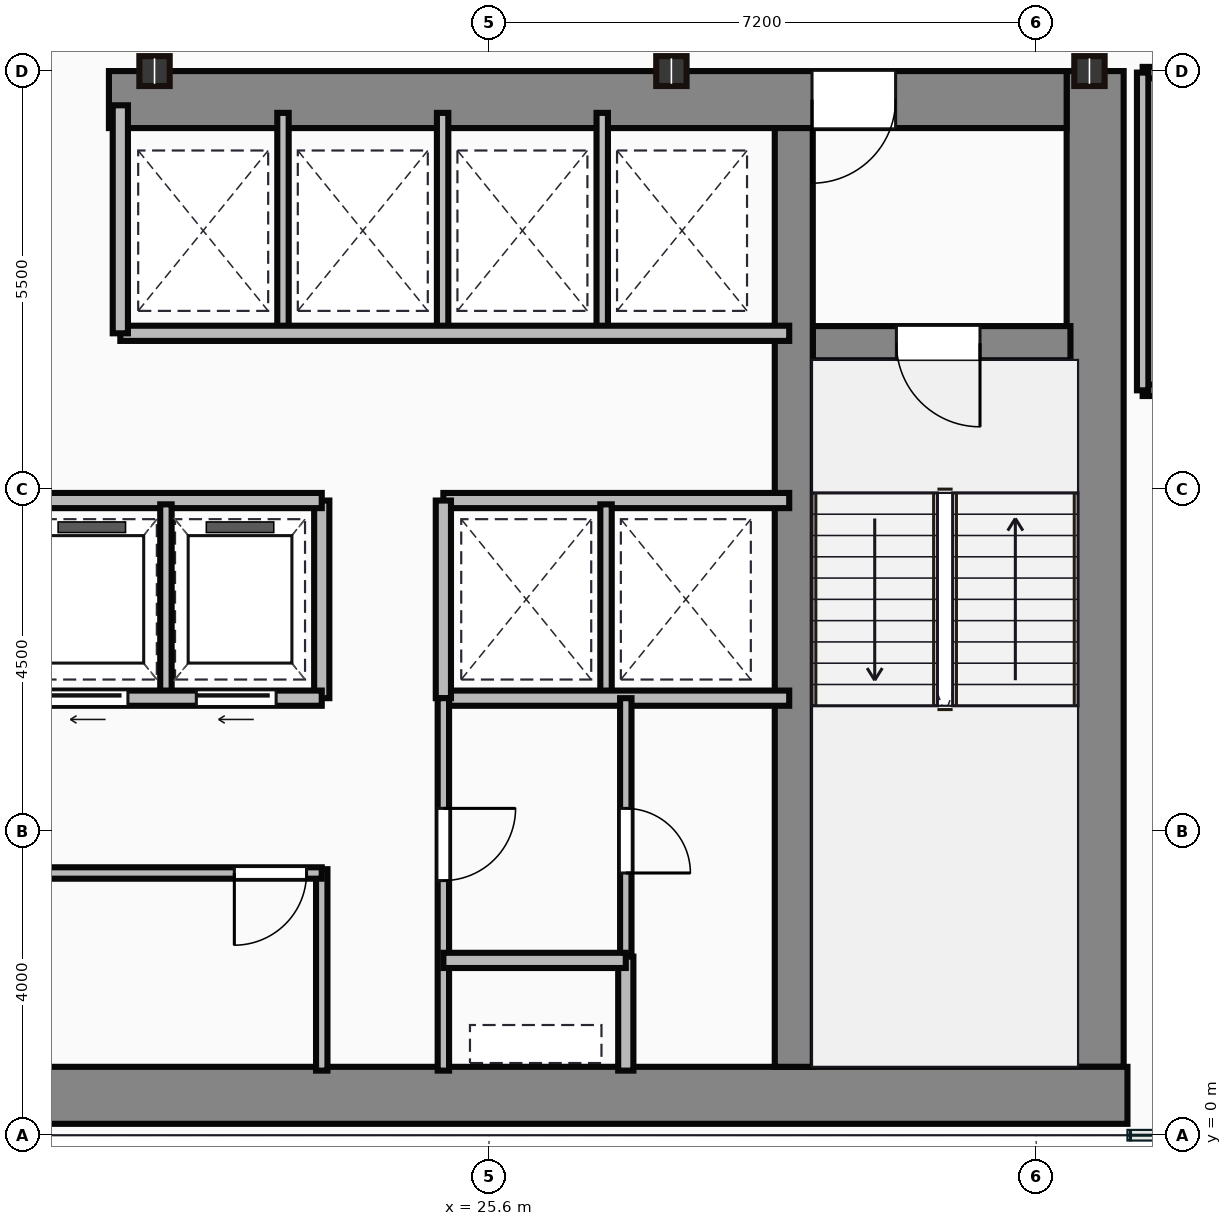
"""IFC4 building model, lengths in metres.
Left out: names, types, materials, properties, quantities, classifications, styles, units other than length and angle.
Written with IfcOpenShell. Run it as: python <this file> out.ifc"""

import sys

from ifc_helpers import new_model, si_unit, direction, frame, frame_2d, origin, origin_2d, place, context, subcontext, project, spatial, rectangle, i_section, extrude, source, transform, mapped, element, fill, save


model = new_model("IFC4")
c1 = context("Model", 3, precision=1e-05, world=origin(), true_north=direction((0.0, 1.0)))
c2 = subcontext(c1, "Body", "Model", "MODEL_VIEW")
j1 = project(units=[si_unit("LENGTHUNIT", "METRE"), si_unit("PLANEANGLEUNIT", "RADIAN")], contexts=[c1])
p1 = place(None, origin())
s1 = spatial("IfcSite", under=j1, at=p1, CompositionType="ELEMENT")
p2 = place(p1, origin())
s2 = spatial("IfcBuilding", under=s1, at=p2, CompositionType="ELEMENT")
p3 = place(p2, frame((0.0, 0.0, 114.2)))
s3 = spatial("IfcBuildingStorey", under=s2, at=p3, CompositionType="ELEMENT", Elevation=114.2)
m1 = source(origin(), c2, "Body", "SweptSolid", [
    extrude(rectangle(XDim=29.5, YDim=0.75, at=frame_2d((14.75, 0.0))), origin(), (0.0, 0.0, 1.0), 3.65),
])
p4 = place(p3, frame((4.5, 0.525, 0.0), z_axis=(0.0, 0.0, 1.0), x_axis=(1.0, 0.0, 0.0)))
e1 = element("IfcWall", 1, at=p4, inside=s3, PredefinedType="SHEAR", context=c2, shape_type="MappedRepresentation", body=[
    mapped(m1, transform((0.0, 0.0, 0.0))),
])
m2 = source(origin(), c2, "Body", "SweptSolid", [
    extrude(rectangle(XDim=13.1, YDim=0.75, at=frame_2d((6.55, 0.0))), origin(), (0.0, 0.0, 1.0), 3.65),
])
p5 = place(p3, frame((33.575, 0.9, 0.0), z_axis=(0.0, 0.0, 1.0), x_axis=(0.0, 1.0, 0.0)))
e2 = element("IfcWall", 2, at=p5, inside=s3, PredefinedType="SHEAR", context=c2, shape_type="MappedRepresentation", body=[
    mapped(m2, transform((0.0, 0.0, 0.0))),
])
m3 = source(origin(), c2, "Body", "SweptSolid", [
    extrude(rectangle(XDim=12.6, YDim=0.75, at=frame_2d((6.3, 0.0))), origin(), (0.0, 0.0, 1.0), 3.65),
])
p6 = place(p3, frame((20.6, 13.625, 0.0), z_axis=(0.0, 0.0, 1.0), x_axis=(1.0, 0.0, 0.0)))
e3 = element("IfcWall", 3, at=p6, inside=s3, PredefinedType="SHEAR", context=c2, shape_type="MappedRepresentation", body=[
    mapped(m3, transform((0.0, 0.0, 0.0))),
])
p7 = place(p6, frame((9.25, 0.0, 0.0)))
e4 = element("IfcOpeningElement", 4, at=p7, cuts=e3, PredefinedType="OPENING", context=c2, shape_type="SweptSolid", body=[
    extrude(rectangle(XDim=1.1, YDim=2.15, at=frame_2d((0.55, 1.075))), frame((0.0, 0.385, 0.0), z_axis=(0.0, -1.0, 0.0), x_axis=(1.0, 0.0, 0.0)), (0.0, 0.0, 1.0), 0.77),
])
m4 = source(origin(), c2, "Body", "SweptSolid", [
    extrude(rectangle(XDim=12.35, YDim=0.5, at=frame_2d((6.175, 0.0))), origin(), (0.0, 0.0, 1.0), 3.65),
])
p8 = place(p3, frame((29.61, 0.9, 0.0), z_axis=(0.0, 0.0, 1.0), x_axis=(0.0, 1.0, 0.0)))
e5 = element("IfcWall", 5, at=p8, inside=s3, PredefinedType="SHEAR", context=c2, shape_type="MappedRepresentation", body=[
    mapped(m4, transform((0.0, 0.0, 0.0))),
])
m5 = source(origin(), c2, "Body", "SweptSolid", [
    extrude(rectangle(XDim=3.39, YDim=0.45, at=frame_2d((1.695, 0.0))), origin(), (0.0, 0.0, 1.0), 3.65),
])
p9 = place(p3, frame((29.86, 10.42, 0.0), z_axis=(0.0, 0.0, 1.0), x_axis=(1.0, 0.0, 0.0)))
e6 = element("IfcWall", 6, at=p9, inside=s3, PredefinedType="SHEAR", context=c2, shape_type="MappedRepresentation", body=[
    mapped(m5, transform((0.0, 0.0, 0.0))),
])
p10 = place(p9, frame((1.1, 0.0, 0.0)))
e7 = element("IfcOpeningElement", 7, at=p10, cuts=e6, PredefinedType="OPENING", context=c2, shape_type="SweptSolid", body=[
    extrude(rectangle(XDim=1.1, YDim=2.15, at=frame_2d((0.55, 1.075))), frame((0.0, 0.235, 0.0), z_axis=(0.0, -1.0, 0.0), x_axis=(1.0, 0.0, 0.0)), (0.0, 0.0, 1.0), 0.47),
])
m6 = source(origin(), c2, "Body", "SweptSolid", [
    extrude(i_section(OverallWidth=0.399, OverallDepth=0.393, WebThickness=0.023, FlangeThickness=0.037, at=origin_2d()), origin(), (0.0, 0.0, 1.0), 3.65),
])
for number, where, z_axis, x_axis in (
    (8, (21.2, 14.0, 0.0), (0.0, 0.0, 1.0), (1.0, 0.0, 0.0)),
    (9, (28.0, 14.0, 0.0), (0.0, 0.0, 1.0), (1.0, 0.0, 0.0)),
    (10, (33.5, 14.0, 0.0), (0.0, 0.0, 1.0), (1.0, 0.0, 0.0)),
):
    element("IfcColumn", number, at=place(p3, frame(where, z_axis=z_axis, x_axis=x_axis)), inside=s3, PredefinedType="COLUMN", context=c2, shape_type="MappedRepresentation", body=[
        mapped(m6, transform((0.0, 0.0, 0.0))),
    ])
m7 = source(origin(), c2, "Body", "SweptSolid", [
    extrude(rectangle(XDim=10.35, YDim=0.15, at=frame_2d((5.175, 0.0))), origin(), (0.0, 0.0, 1.0), 3.4),
])
p11 = place(p3, frame((13.05, 3.45, 0.0), z_axis=(0.0, 0.0, 1.0), x_axis=(1.0, 0.0, 0.0)))
e11 = element("IfcWall", 11, at=p11, inside=s3, PredefinedType="PARTITIONING", context=c2, shape_type="MappedRepresentation", body=[
    mapped(m7, transform((0.0, 0.0, 0.0))),
])
p12 = place(p11, frame((1.1, 0.0, 0.0)))
e12 = element("IfcOpeningElement", 12, at=p12, cuts=e11, PredefinedType="OPENING", context=c2, shape_type="SweptSolid", body=[
    extrude(rectangle(XDim=0.95, YDim=2.15, at=frame_2d((0.475, 1.075))), frame((0.0, 0.085, 0.0), z_axis=(0.0, -1.0, 0.0), x_axis=(1.0, 0.0, 0.0)), (0.0, 0.0, 1.0), 0.17),
])
p13 = place(p11, frame((5.1, 0.0, 0.0)))
e13 = element("IfcOpeningElement", 13, at=p13, cuts=e11, PredefinedType="OPENING", context=c2, shape_type="SweptSolid", body=[
    extrude(rectangle(XDim=0.95, YDim=2.15, at=frame_2d((0.475, 1.075))), frame((0.0, 0.085, 0.0), z_axis=(0.0, -1.0, 0.0), x_axis=(1.0, 0.0, 0.0)), (0.0, 0.0, 1.0), 0.17),
])
p14 = place(p11, frame((9.2, 0.0, 0.0)))
e14 = element("IfcOpeningElement", 14, at=p14, cuts=e11, PredefinedType="OPENING", context=c2, shape_type="SweptSolid", body=[
    extrude(rectangle(XDim=0.95, YDim=2.15, at=frame_2d((0.475, 1.075))), frame((0.0, 0.085, 0.0), z_axis=(0.0, -1.0, 0.0), x_axis=(1.0, 0.0, 0.0)), (0.0, 0.0, 1.0), 0.17),
])
m8 = source(origin(), c2, "Body", "SweptSolid", [
    extrude(rectangle(XDim=2.65, YDim=0.15, at=frame_2d((1.325, 0.0))), origin(), (0.0, 0.0, 1.0), 3.4),
])
p15 = place(p3, frame((23.4, 0.85, 0.0), z_axis=(0.0, 0.0, 1.0), x_axis=(0.0, 1.0, 0.0)))
e15 = element("IfcWall", 15, at=p15, inside=s3, PredefinedType="PARTITIONING", context=c2, shape_type="MappedRepresentation", body=[
    mapped(m8, transform((0.0, 0.0, 0.0))),
])
m9 = source(origin(), c2, "Body", "SweptSolid", [
    extrude(rectangle(XDim=11.85, YDim=0.2, at=frame_2d((5.925, 0.0))), origin(), (0.0, 0.0, 1.0), 3.4),
])
p16 = place(p3, frame((11.55, 5.75, 0.0), z_axis=(0.0, 0.0, 1.0), x_axis=(1.0, 0.0, 0.0)))
e16 = element("IfcWall", 16, at=p16, inside=s3, PredefinedType="PARTITIONING", context=c2, shape_type="MappedRepresentation", body=[
    mapped(m9, transform((0.0, 0.0, 0.0))),
])
p17 = place(p16, frame((0.45, 0.0, 0.0)))
e17 = element("IfcOpeningElement", 17, at=p17, cuts=e16, PredefinedType="OPENING", context=c2, shape_type="SweptSolid", body=[
    extrude(rectangle(XDim=1.05, YDim=2.15, at=frame_2d((0.525, 1.075))), frame((0.0, 0.11, 0.0), z_axis=(0.0, -1.0, 0.0), x_axis=(1.0, 0.0, 0.0)), (0.0, 0.0, 1.0), 0.22),
])
p18 = place(p16, frame((2.4, 0.0, 0.0)))
e18 = element("IfcOpeningElement", 18, at=p18, cuts=e16, PredefinedType="OPENING", context=c2, shape_type="SweptSolid", body=[
    extrude(rectangle(XDim=1.05, YDim=2.15, at=frame_2d((0.525, 1.075))), frame((0.0, 0.11, 0.0), z_axis=(0.0, -1.0, 0.0), x_axis=(1.0, 0.0, 0.0)), (0.0, 0.0, 1.0), 0.22),
])
p19 = place(p16, frame((4.35, 0.0, 0.0)))
e19 = element("IfcOpeningElement", 19, at=p19, cuts=e16, PredefinedType="OPENING", context=c2, shape_type="SweptSolid", body=[
    extrude(rectangle(XDim=1.05, YDim=2.15, at=frame_2d((0.525, 1.075))), frame((0.0, 0.11, 0.0), z_axis=(0.0, -1.0, 0.0), x_axis=(1.0, 0.0, 0.0)), (0.0, 0.0, 1.0), 0.22),
])
p20 = place(p16, frame((6.3, 0.0, 0.0)))
e20 = element("IfcOpeningElement", 20, at=p20, cuts=e16, PredefinedType="OPENING", context=c2, shape_type="SweptSolid", body=[
    extrude(rectangle(XDim=1.05, YDim=2.15, at=frame_2d((0.525, 1.075))), frame((0.0, 0.11, 0.0), z_axis=(0.0, -1.0, 0.0), x_axis=(1.0, 0.0, 0.0)), (0.0, 0.0, 1.0), 0.22),
])
p21 = place(p16, frame((8.25, 0.0, 0.0)))
e21 = element("IfcOpeningElement", 21, at=p21, cuts=e16, PredefinedType="OPENING", context=c2, shape_type="SweptSolid", body=[
    extrude(rectangle(XDim=1.05, YDim=2.15, at=frame_2d((0.525, 1.075))), frame((0.0, 0.11, 0.0), z_axis=(0.0, -1.0, 0.0), x_axis=(1.0, 0.0, 0.0)), (0.0, 0.0, 1.0), 0.22),
])
p22 = place(p16, frame((10.2, 0.0, 0.0)))
e22 = element("IfcOpeningElement", 22, at=p22, cuts=e16, PredefinedType="OPENING", context=c2, shape_type="SweptSolid", body=[
    extrude(rectangle(XDim=1.05, YDim=2.15, at=frame_2d((0.525, 1.075))), frame((0.0, 0.11, 0.0), z_axis=(0.0, -1.0, 0.0), x_axis=(1.0, 0.0, 0.0)), (0.0, 0.0, 1.0), 0.22),
])
p23 = place(p3, frame((11.55, 8.35, 0.0), z_axis=(0.0, 0.0, 1.0), x_axis=(1.0, 0.0, 0.0)))
e23 = element("IfcWall", 23, at=p23, inside=s3, PredefinedType="PARTITIONING", context=c2, shape_type="MappedRepresentation", body=[
    mapped(m9, transform((0.0, 0.0, 0.0))),
])
m10 = source(origin(), c2, "Body", "SweptSolid", [
    extrude(rectangle(XDim=2.6, YDim=0.2, at=frame_2d((1.3, 0.0))), origin(), (0.0, 0.0, 1.0), 3.4),
])
p24 = place(p3, frame((23.4, 5.75, 0.0), z_axis=(0.0, 0.0, 1.0), x_axis=(0.0, 1.0, 0.0)))
e24 = element("IfcWall", 24, at=p24, inside=s3, PredefinedType="PARTITIONING", context=c2, shape_type="MappedRepresentation", body=[
    mapped(m10, transform((0.0, 0.0, 0.0))),
])
m11 = source(origin(), c2, "Body", "SweptSolid", [
    extrude(rectangle(XDim=2.5, YDim=0.15, at=frame_2d((1.25, 0.0))), origin(), (0.0, 0.0, 1.0), 3.4),
])
p25 = place(p3, frame((21.35, 5.8, 0.0), z_axis=(0.0, 0.0, 1.0), x_axis=(0.0, 1.0, 0.0)))
e25 = element("IfcWall", 25, at=p25, inside=s3, PredefinedType="PARTITIONING", context=c2, shape_type="MappedRepresentation", body=[
    mapped(m11, transform((0.0, 0.0, 0.0))),
])
m12 = source(origin(), c2, "Body", "SweptSolid", [
    extrude(rectangle(XDim=8.8, YDim=0.2, at=frame_2d((4.4, 0.0))), origin(), (0.0, 0.0, 1.0), 3.4),
])
p26 = place(p3, frame((20.75, 10.55, 0.0), z_axis=(0.0, 0.0, 1.0), x_axis=(1.0, 0.0, 0.0)))
e26 = element("IfcWall", 26, at=p26, inside=s3, PredefinedType="PARTITIONING", context=c2, shape_type="MappedRepresentation", body=[
    mapped(m12, transform((0.0, 0.0, 0.0))),
])
m13 = source(origin(), c2, "Body", "SweptSolid", [
    extrude(rectangle(XDim=3.0, YDim=0.2, at=frame_2d((1.5, 0.0))), origin(), (0.0, 0.0, 1.0), 3.4),
])
p27 = place(p3, frame((20.75, 10.55, 0.0), z_axis=(0.0, 0.0, 1.0), x_axis=(0.0, 1.0, 0.0)))
e27 = element("IfcWall", 27, at=p27, inside=s3, PredefinedType="PARTITIONING", context=c2, shape_type="MappedRepresentation", body=[
    mapped(m13, transform((0.0, 0.0, 0.0))),
])
m14 = source(origin(), c2, "Body", "SweptSolid", [
    extrude(rectangle(XDim=2.85, YDim=0.15, at=frame_2d((1.425, 0.0))), origin(), (0.0, 0.0, 1.0), 3.4),
])
for number, where, z_axis, x_axis in (
    (28, (22.89, 10.6, 0.0), (0.0, 0.0, 1.0), (0.0, 1.0, 0.0)),
    (29, (24.99, 10.6, 0.0), (0.0, 0.0, 1.0), (0.0, 1.0, 0.0)),
    (30, (27.09, 10.6, 0.0), (0.0, 0.0, 1.0), (0.0, 1.0, 0.0)),
):
    element("IfcWall", number, at=place(p3, frame(where, z_axis=z_axis, x_axis=x_axis)), inside=s3, PredefinedType="PARTITIONING", context=c2, shape_type="MappedRepresentation", body=[
        mapped(m14, transform((0.0, 0.0, 0.0))),
    ])
m15 = source(origin(), c2, "Body", "SweptSolid", [
    extrude(rectangle(XDim=4.55, YDim=0.2, at=frame_2d((2.275, 0.0))), origin(), (0.0, 0.0, 1.0), 3.4),
])
for number, where, z_axis, x_axis in (
    (31, (25.0, 8.35, 0.0), (0.0, 0.0, 1.0), (1.0, 0.0, 0.0)),
    (32, (25.0, 5.75, 0.0), (0.0, 0.0, 1.0), (1.0, 0.0, 0.0)),
):
    element("IfcWall", number, at=place(p3, frame(where, z_axis=z_axis, x_axis=x_axis)), inside=s3, PredefinedType="PARTITIONING", context=c2, shape_type="MappedRepresentation", body=[
        mapped(m15, transform((0.0, 0.0, 0.0))),
    ])
p28 = place(p3, frame((25.0, 5.75, 0.0), z_axis=(0.0, 0.0, 1.0), x_axis=(0.0, 1.0, 0.0)))
e33 = element("IfcWall", 33, at=p28, inside=s3, PredefinedType="PARTITIONING", context=c2, shape_type="MappedRepresentation", body=[
    mapped(m10, transform((0.0, 0.0, 0.0))),
])
p29 = place(p3, frame((27.14, 5.8, 0.0), z_axis=(0.0, 0.0, 1.0), x_axis=(0.0, 1.0, 0.0)))
e34 = element("IfcWall", 34, at=p29, inside=s3, PredefinedType="PARTITIONING", context=c2, shape_type="MappedRepresentation", body=[
    mapped(m11, transform((0.0, 0.0, 0.0))),
])
m16 = source(origin(), c2, "Body", "SweptSolid", [
    extrude(rectangle(XDim=4.9, YDim=0.15, at=frame_2d((2.45, 0.0))), origin(), (0.0, 0.0, 1.0), 3.4),
])
p30 = place(p3, frame((25.0, 0.85, 0.0), z_axis=(0.0, 0.0, 1.0), x_axis=(0.0, 1.0, 0.0)))
e35 = element("IfcWall", 35, at=p30, inside=s3, PredefinedType="PARTITIONING", context=c2, shape_type="MappedRepresentation", body=[
    mapped(m16, transform((0.0, 0.0, 0.0))),
])
p31 = place(p30, frame((2.5, 0.0, 0.0)))
e36 = element("IfcOpeningElement", 36, at=p31, cuts=e35, PredefinedType="OPENING", context=c2, shape_type="SweptSolid", body=[
    extrude(rectangle(XDim=0.95, YDim=2.15, at=frame_2d((0.475, 1.075))), frame((0.0, 0.085, 0.0), z_axis=(0.0, -1.0, 0.0), x_axis=(1.0, 0.0, 0.0)), (0.0, 0.0, 1.0), 0.17),
])
m17 = source(origin(), c2, "Body", "SweptSolid", [
    extrude(rectangle(XDim=2.4, YDim=0.2, at=frame_2d((1.2, 0.0))), origin(), (0.0, 0.0, 1.0), 3.4),
])
p32 = place(p3, frame((25.0, 2.3, 0.0), z_axis=(0.0, 0.0, 1.0), x_axis=(1.0, 0.0, 0.0)))
e37 = element("IfcWall", 37, at=p32, inside=s3, PredefinedType="PARTITIONING", context=c2, shape_type="MappedRepresentation", body=[
    mapped(m17, transform((0.0, 0.0, 0.0))),
])
m18 = source(origin(), c2, "Body", "SweptSolid", [
    extrude(rectangle(XDim=1.5, YDim=0.2, at=frame_2d((0.75, 0.0))), origin(), (0.0, 0.0, 1.0), 3.4),
])
p33 = place(p3, frame((27.4, 0.85, 0.0), z_axis=(0.0, 0.0, 1.0), x_axis=(0.0, 1.0, 0.0)))
e38 = element("IfcWall", 38, at=p33, inside=s3, PredefinedType="PARTITIONING", context=c2, shape_type="MappedRepresentation", body=[
    mapped(m18, transform((0.0, 0.0, 0.0))),
])
m19 = source(origin(), c2, "Body", "SweptSolid", [
    extrude(rectangle(XDim=3.4, YDim=0.15, at=frame_2d((1.7, 0.0))), origin(), (0.0, 0.0, 1.0), 3.4),
])
p34 = place(p3, frame((27.4, 2.35, 0.0), z_axis=(0.0, 0.0, 1.0), x_axis=(0.0, 1.0, 0.0)))
e39 = element("IfcWall", 39, at=p34, inside=s3, PredefinedType="PARTITIONING", context=c2, shape_type="MappedRepresentation", body=[
    mapped(m19, transform((0.0, 0.0, 0.0))),
])
p35 = place(p34, frame((1.1, 0.0, 0.0)))
e40 = element("IfcOpeningElement", 40, at=p35, cuts=e39, PredefinedType="OPENING", context=c2, shape_type="SweptSolid", body=[
    extrude(rectangle(XDim=0.85, YDim=2.1, at=frame_2d((0.425, 1.05))), frame((0.0, 0.085, 0.0), z_axis=(0.0, -1.0, 0.0), x_axis=(1.0, 0.0, 0.0)), (0.0, 0.0, 1.0), 0.17),
])
m20 = source(origin(), c2, "Body", "SweptSolid", [
    extrude(rectangle(XDim=4.8, YDim=0.15, at=frame_2d((2.4, 0.0))), origin(), (0.0, 0.0, 1.0), 2.702),
])
p36 = place(p3, frame((34.2, 13.98, 0.0), z_axis=(0.0, 0.0, 1.0), x_axis=(1.0, 0.0, 0.0)))
e41 = element("IfcWall", 41, at=p36, inside=s3, PredefinedType="PARTITIONING", context=c2, shape_type="MappedRepresentation", body=[
    mapped(m20, transform((0.0, 0.0, 0.0))),
])
p37 = place(p36, frame((0.35, 0.0, 0.0)))
e42 = element("IfcOpeningElement", 42, at=p37, cuts=e41, PredefinedType="OPENING", context=c2, shape_type="SweptSolid", body=[
    extrude(rectangle(XDim=0.85, YDim=2.1, at=frame_2d((0.425, 1.05))), frame((0.0, 0.085, 0.0), z_axis=(0.0, -1.0, 0.0), x_axis=(1.0, 0.0, 0.0)), (0.0, 0.0, 1.0), 0.17),
])
p38 = place(p36, frame((1.95, 0.0, 0.0)))
e43 = element("IfcOpeningElement", 43, at=p38, cuts=e41, PredefinedType="OPENING", context=c2, shape_type="SweptSolid", body=[
    extrude(rectangle(XDim=0.85, YDim=2.1, at=frame_2d((0.425, 1.05))), frame((0.0, 0.085, 0.0), z_axis=(0.0, -1.0, 0.0), x_axis=(1.0, 0.0, 0.0)), (0.0, 0.0, 1.0), 0.17),
])
p39 = place(p36, frame((3.5, 0.0, 0.0)))
e44 = element("IfcOpeningElement", 44, at=p39, cuts=e41, PredefinedType="OPENING", context=c2, shape_type="SweptSolid", body=[
    extrude(rectangle(XDim=0.9, YDim=2.1, at=frame_2d((0.45, 1.05))), frame((0.0, 0.085, 0.0), z_axis=(0.0, -1.0, 0.0), x_axis=(1.0, 0.0, 0.0)), (0.0, 0.0, 1.0), 0.17),
])
m21 = source(origin(), c2, "Body", "SweptSolid", [
    extrude(rectangle(XDim=4.8, YDim=0.15, at=frame_2d((2.4, 0.0))), origin(), (0.0, 0.0, 1.0), 3.4),
])
p40 = place(p3, frame((34.2, 9.8, 0.0), z_axis=(0.0, 0.0, 1.0), x_axis=(1.0, 0.0, 0.0)))
e45 = element("IfcWall", 45, at=p40, inside=s3, PredefinedType="PARTITIONING", context=c2, shape_type="MappedRepresentation", body=[
    mapped(m21, transform((0.0, 0.0, 0.0))),
])
m22 = source(origin(), c2, "Body", "SweptSolid", [
    extrude(rectangle(XDim=4.18, YDim=0.15, at=frame_2d((2.09, 0.0))), origin(), (0.0, 0.0, 1.0), 3.4),
])
p41 = place(p3, frame((34.2, 9.8, 0.0), z_axis=(0.0, 0.0, 1.0), x_axis=(0.0, 1.0, 0.0)))
e46 = element("IfcWall", 46, at=p41, inside=s3, PredefinedType="PARTITIONING", context=c2, shape_type="MappedRepresentation", body=[
    mapped(m22, transform((0.0, 0.0, 0.0))),
])
m23 = source(origin(), c2, "Body", "SweptSolid", [
    extrude(rectangle(XDim=1.1, YDim=2.15, at=frame_2d((0.55, 1.075))), frame((0.0, 0.025, 0.0), z_axis=(0.0, -1.0, 0.0), x_axis=(1.0, 0.0, 0.0)), (0.0, 0.0, 1.0), 0.05),
])
p42 = place(p10, frame((1.1, 0.0, 0.0), z_axis=(0.0, 0.0, 1.0), x_axis=(-1.0, 0.0, 0.0)))
e47 = element("IfcDoor", 47, at=p42, inside=s3, OperationType="SINGLE_SWING_RIGHT", PredefinedType="DOOR", context=c2, shape_type="MappedRepresentation", body=[
    mapped(m23, transform((0.0, 0.0, 0.0))),
])
fill(e7, e47)
p43 = place(p7, origin())
e48 = element("IfcDoor", 48, at=p43, inside=s3, OperationType="SINGLE_SWING_LEFT", PredefinedType="DOOR", context=c2, shape_type="MappedRepresentation", body=[
    mapped(m23, transform((0.0, 0.0, 0.0))),
])
fill(e4, e48)
m24 = source(origin(), c2, "Body", "SweptSolid", [
    extrude(rectangle(XDim=0.95, YDim=2.15, at=frame_2d((0.475, 1.075))), frame((0.0, 0.025, 0.0), z_axis=(0.0, -1.0, 0.0), x_axis=(1.0, 0.0, 0.0)), (0.0, 0.0, 1.0), 0.05),
])
p44 = place(p14, origin())
e49 = element("IfcDoor", 49, at=p44, inside=s3, OperationType="SINGLE_SWING_LEFT", PredefinedType="DOOR", context=c2, shape_type="MappedRepresentation", body=[
    mapped(m24, transform((0.0, 0.0, 0.0))),
])
fill(e14, e49)
m25 = source(origin(), c2, "Body", "SweptSolid", [
    extrude(rectangle(XDim=1.05, YDim=2.15, at=frame_2d((0.525, 1.075))), frame((0.0, 0.025, 0.0), z_axis=(0.0, -1.0, 0.0), x_axis=(1.0, 0.0, 0.0)), (0.0, 0.0, 1.0), 0.05),
])
p45 = place(p21, frame((1.05, 0.0, 0.0), z_axis=(0.0, 0.0, 1.0), x_axis=(-1.0, 0.0, 0.0)))
e50 = element("IfcDoor", 50, at=p45, inside=s3, OperationType="SLIDING_TO_LEFT", PredefinedType="DOOR", context=c2, shape_type="MappedRepresentation", body=[
    mapped(m25, transform((0.0, 0.0, 0.0))),
])
fill(e21, e50)
p46 = place(p22, frame((1.05, 0.0, 0.0), z_axis=(0.0, 0.0, 1.0), x_axis=(-1.0, 0.0, 0.0)))
e51 = element("IfcDoor", 51, at=p46, inside=s3, OperationType="SLIDING_TO_LEFT", PredefinedType="DOOR", context=c2, shape_type="MappedRepresentation", body=[
    mapped(m25, transform((0.0, 0.0, 0.0))),
])
fill(e22, e51)
p47 = place(p31, origin())
e52 = element("IfcDoor", 52, at=p47, inside=s3, OperationType="SINGLE_SWING_RIGHT", PredefinedType="DOOR", context=c2, shape_type="MappedRepresentation", body=[
    mapped(m24, transform((0.0, 0.0, 0.0))),
])
fill(e36, e52)
m26 = source(origin(), c2, "Body", "SweptSolid", [
    extrude(rectangle(XDim=0.85, YDim=2.1, at=frame_2d((0.425, 1.05))), frame((0.0, 0.025, 0.0), z_axis=(0.0, -1.0, 0.0), x_axis=(1.0, 0.0, 0.0)), (0.0, 0.0, 1.0), 0.05),
])
p48 = place(p35, frame((0.85, 0.0, 0.0), z_axis=(0.0, 0.0, 1.0), x_axis=(-1.0, 0.0, 0.0)))
e53 = element("IfcDoor", 53, at=p48, inside=s3, OperationType="SINGLE_SWING_LEFT", PredefinedType="DOOR", context=c2, shape_type="MappedRepresentation", body=[
    mapped(m26, transform((0.0, 0.0, 0.0))),
])
fill(e40, e53)
save(model, sys.argv[1])
